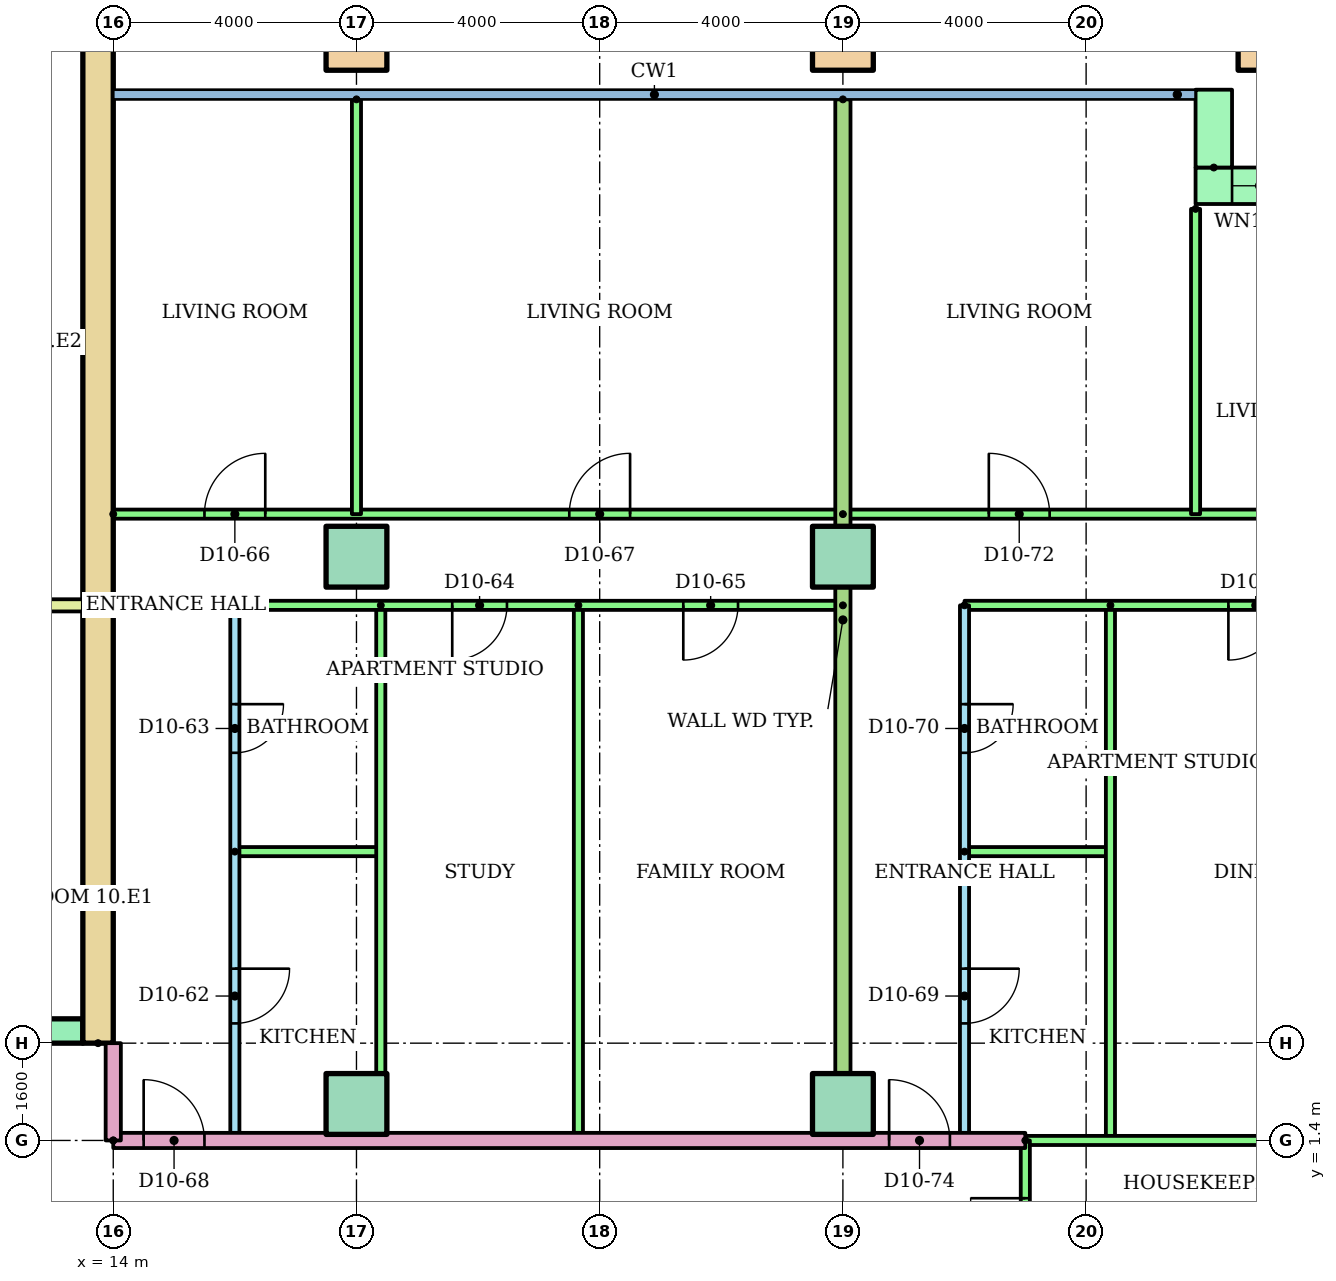
"""IFC4 building model, lengths in metres.
Left out: names, types, materials, properties, quantities, classifications, styles, units other than length and angle.
Written with IfcOpenShell. Run it as: python <this file> out.ifc"""

import sys

from ifc_helpers import new_model, si_unit, direction, frame, frame_2d, origin, origin_2d, place, context, subcontext, project, spatial, rectangle, hollow_rectangle, extrude, element, fill, save


model = new_model("IFC4")
c1 = context("Model", 3, precision=1e-05, world=origin(), true_north=direction((0.0, 1.0)))
c2 = subcontext(c1, "Body", "Model", "MODEL_VIEW")
j1 = project(units=[si_unit("LENGTHUNIT", "METRE"), si_unit("PLANEANGLEUNIT", "RADIAN")], contexts=[c1])
p1 = place(None, origin())
s1 = spatial("IfcSite", under=j1, at=p1, CompositionType="ELEMENT")
p2 = place(p1, origin())
s2 = spatial("IfcBuilding", under=s1, at=p2, CompositionType="ELEMENT")
p3 = place(p2, frame((0.0, 0.0, 41.6)))
s3 = spatial("IfcBuildingStorey", under=s2, at=p3, CompositionType="ELEMENT", Elevation=41.6)
for number, where in (
    (1, (18.0, 2.0, 0.0)),
    (2, (26.0, 2.0, 0.0)),
    (3, (18.0, 11.0, 0.0)),
    (4, (26.0, 11.0, 0.0)),
):
    element("IfcColumn", number, at=place(p3, frame(where)), inside=s3, PredefinedType="COLUMN", context=c2, shape_type="SweptSolid", body=[
        extrude(rectangle(XDim=1.0, YDim=1.0, at=origin_2d()), origin(), (0.0, 0.0, 1.0), 3.2),
    ])
for number, where in (
    (5, (18.0, 19.5, 0.0)),
    (6, (26.0, 19.5, 0.0)),
    (7, (33.0, 19.5, 0.0)),
):
    element("IfcColumn", number, at=place(p3, frame(where)), inside=s3, PredefinedType="COLUMN", context=c2, shape_type="SweptSolid", body=[
        extrude(hollow_rectangle(XDim=1.0, YDim=1.0, WallThickness=0.05, at=origin_2d()), origin(), (0.0, 0.0, 1.0), 3.2),
    ])
p4 = place(p3, frame((33.9, 17.1, 0.0), z_axis=(0.0, 0.0, 1.0), x_axis=(-1.0, 0.0, 0.0)))
e8 = element("IfcWall", 8, at=p4, inside=s3, PredefinedType="STANDARD", context=c2, shape_type="SweptSolid", body=[
    extrude(rectangle(XDim=2.1, YDim=0.6, at=frame_2d((1.05, 0.0))), origin(), (0.0, 0.0, 1.0), 2.92),
])
p5 = place(p4, frame((0.6, 0.0, 0.9)))
e9 = element("IfcOpeningElement", 9, at=p5, cuts=e8, PredefinedType="OPENING", context=c2, shape_type="SweptSolid", body=[
    extrude(rectangle(XDim=0.9, YDim=1.5, at=frame_2d((0.45, 0.75))), frame((0.0, 0.31, 0.0), z_axis=(0.0, -1.0, 0.0), x_axis=(1.0, 0.0, 0.0)), (0.0, 0.0, 1.0), 0.62),
])
p6 = place(p3, frame((32.1, 17.4, 0.0), z_axis=(0.0, 0.0, 1.0), x_axis=(0.0, 1.0, 0.0)))
e10 = element("IfcWall", 10, at=p6, inside=s3, PredefinedType="STANDARD", context=c2, shape_type="SweptSolid", body=[
    extrude(rectangle(XDim=1.28, YDim=0.6, at=frame_2d((0.64, 0.0))), origin(), (0.0, 0.0, 1.0), 2.92),
])
p7 = place(p3, frame((13.75, 3.0, 0.0), z_axis=(0.0, 0.0, 1.0), x_axis=(0.0, 1.0, 0.0)))
e11 = element("IfcWall", 11, at=p7, inside=s3, PredefinedType="SHEAR", context=c2, shape_type="SweptSolid", body=[
    extrude(rectangle(XDim=17.0, YDim=0.5, at=frame_2d((8.5, 0.0))), origin(), (0.0, 0.0, 1.0), 2.92),
])
p8 = place(p3, frame((-13.5, 3.2, 0.0)))
e12 = element("IfcWall", 12, at=p8, inside=s3, PredefinedType="SHEAR", context=c2, shape_type="SweptSolid", body=[
    extrude(rectangle(XDim=27.0, YDim=0.4, at=frame_2d((13.5, 0.0))), origin(), (0.0, 0.0, 1.0), 2.92),
])
p9 = place(p8, frame((6.861, 0.0, 0.0)))
e13 = element("IfcOpeningElement", 13, at=p9, cuts=e12, PredefinedType="OPENING", context=c2, shape_type="SweptSolid", body=[
    extrude(rectangle(XDim=1.1, YDim=2.1, at=frame_2d((0.55, 1.05))), frame((0.0, 0.21, 0.0), z_axis=(0.0, -1.0, 0.0), x_axis=(1.0, 0.0, 0.0)), (0.0, 0.0, 1.0), 0.42),
])
p10 = place(p8, frame((9.906, 0.0, 0.0)))
e14 = element("IfcOpeningElement", 14, at=p10, cuts=e12, PredefinedType="OPENING", context=c2, shape_type="SweptSolid", body=[
    extrude(rectangle(XDim=1.1, YDim=2.1, at=frame_2d((0.55, 1.05))), frame((0.0, 0.21, 0.0), z_axis=(0.0, -1.0, 0.0), x_axis=(1.0, 0.0, 0.0)), (0.0, 0.0, 1.0), 0.42),
])
p11 = place(p8, frame((15.994, 0.0, 0.0)))
e15 = element("IfcOpeningElement", 15, at=p11, cuts=e12, PredefinedType="OPENING", context=c2, shape_type="SweptSolid", body=[
    extrude(rectangle(XDim=1.1, YDim=2.1, at=frame_2d((0.55, 1.05))), frame((0.0, 0.21, 0.0), z_axis=(0.0, -1.0, 0.0), x_axis=(1.0, 0.0, 0.0)), (0.0, 0.0, 1.0), 0.42),
])
p12 = place(p8, frame((19.039, 0.0, 0.0)))
e16 = element("IfcOpeningElement", 16, at=p12, cuts=e12, PredefinedType="OPENING", context=c2, shape_type="SweptSolid", body=[
    extrude(rectangle(XDim=1.1, YDim=2.1, at=frame_2d((0.55, 1.05))), frame((0.0, 0.21, 0.0), z_axis=(0.0, -1.0, 0.0), x_axis=(1.0, 0.0, 0.0)), (0.0, 0.0, 1.0), 0.42),
])
p13 = place(p8, frame((12.6, 0.0, 0.0)))
e17 = element("IfcOpeningElement", 17, at=p13, cuts=e12, PredefinedType="OPENING", context=c2, shape_type="SweptSolid", body=[
    extrude(rectangle(XDim=1.8, YDim=2.1, at=frame_2d((0.9, 1.05))), frame((0.0, 0.21, 0.0), z_axis=(0.0, -1.0, 0.0), x_axis=(1.0, 0.0, 0.0)), (0.0, 0.0, 1.0), 0.42),
])
p14 = place(p3, frame((9.6, 10.2, 0.0)))
e18 = element("IfcWall", 18, at=p14, inside=s3, PredefinedType="PARTITIONING", context=c2, shape_type="SweptSolid", body=[
    extrude(rectangle(XDim=3.9, YDim=0.2, at=frame_2d((1.95, 0.0))), origin(), (0.0, 0.0, 1.0), 2.92),
])
p15 = place(p3, frame((16.0, 10.2, 0.0), z_axis=(0.0, 0.0, 1.0), x_axis=(0.0, -1.0, 0.0)))
e19 = element("IfcWall", 19, at=p15, inside=s3, PredefinedType="PARTITIONING", context=c2, shape_type="SweptSolid", body=[
    extrude(rectangle(XDim=8.8, YDim=0.15, at=frame_2d((4.4, 0.0))), origin(), (0.0, 0.0, 1.0), 2.4),
])
p16 = place(p15, frame((5.975, 0.0, 0.0)))
e20 = element("IfcOpeningElement", 20, at=p16, cuts=e19, PredefinedType="OPENING", context=c2, shape_type="SweptSolid", body=[
    extrude(rectangle(XDim=0.9, YDim=2.1, at=frame_2d((0.45, 1.05))), frame((0.0, 0.085, 0.0), z_axis=(0.0, -1.0, 0.0), x_axis=(1.0, 0.0, 0.0)), (0.0, 0.0, 1.0), 0.17),
])
p17 = place(p15, frame((1.625, 0.0, 0.0)))
e21 = element("IfcOpeningElement", 21, at=p17, cuts=e19, PredefinedType="OPENING", context=c2, shape_type="SweptSolid", body=[
    extrude(rectangle(XDim=0.8, YDim=2.1, at=frame_2d((0.4, 1.05))), frame((0.0, 0.085, 0.0), z_axis=(0.0, -1.0, 0.0), x_axis=(1.0, 0.0, 0.0)), (0.0, 0.0, 1.0), 0.17),
])
p18 = place(p3, frame((16.0, 6.15, 0.0)))
e22 = element("IfcWall", 22, at=p18, inside=s3, PredefinedType="PARTITIONING", context=c2, shape_type="SweptSolid", body=[
    extrude(rectangle(XDim=2.4, YDim=0.15, at=frame_2d((1.2, 0.0))), origin(), (0.0, 0.0, 1.0), 2.4),
])
for number, where, z_axis, x_axis in (
    (23, (18.4, 10.2, 0.0), (0.0, 0.0, 1.0), (0.0, -1.0, 0.0)),
    (24, (21.65, 10.2, 0.0), (0.0, 0.0, 1.0), (0.0, -1.0, 0.0)),
):
    element("IfcWall", number, at=place(p3, frame(where, z_axis=z_axis, x_axis=x_axis)), inside=s3, PredefinedType="PARTITIONING", context=c2, shape_type="SweptSolid", body=[
        extrude(rectangle(XDim=8.8, YDim=0.15, at=frame_2d((4.4, 0.0))), origin(), (0.0, 0.0, 1.0), 2.4),
    ])
p19 = place(p3, frame((26.0, 10.2, 0.0), z_axis=(0.0, 0.0, 1.0), x_axis=(-1.0, 0.0, 0.0)))
e25 = element("IfcWall", 25, at=p19, inside=s3, PredefinedType="PARTITIONING", context=c2, shape_type="SweptSolid", body=[
    extrude(rectangle(XDim=10.0, YDim=0.15, at=frame_2d((5.0, 0.0))), origin(), (0.0, 0.0, 1.0), 2.4),
])
p20 = place(p19, frame((5.525, 0.0, 0.0)))
e26 = element("IfcOpeningElement", 26, at=p20, cuts=e25, PredefinedType="OPENING", context=c2, shape_type="SweptSolid", body=[
    extrude(rectangle(XDim=0.9, YDim=2.1, at=frame_2d((0.45, 1.05))), frame((0.0, 0.085, 0.0), z_axis=(0.0, -1.0, 0.0), x_axis=(1.0, 0.0, 0.0)), (0.0, 0.0, 1.0), 0.17),
])
p21 = place(p19, frame((1.725, 0.0, 0.0)))
e27 = element("IfcOpeningElement", 27, at=p21, cuts=e25, PredefinedType="OPENING", context=c2, shape_type="SweptSolid", body=[
    extrude(rectangle(XDim=0.9, YDim=2.1, at=frame_2d((0.45, 1.05))), frame((0.0, 0.085, 0.0), z_axis=(0.0, -1.0, 0.0), x_axis=(1.0, 0.0, 0.0)), (0.0, 0.0, 1.0), 0.17),
])
p22 = place(p3, frame((14.0, 11.7, 0.0)))
e28 = element("IfcWall", 28, at=p22, inside=s3, PredefinedType="PARTITIONING", context=c2, shape_type="SweptSolid", body=[
    extrude(rectangle(XDim=12.0, YDim=0.15, at=frame_2d((6.0, 0.0))), origin(), (0.0, 0.0, 1.0), 2.4),
])
p23 = place(p22, frame((1.5, 0.0, 0.0)))
e29 = element("IfcOpeningElement", 29, at=p23, cuts=e28, PredefinedType="OPENING", context=c2, shape_type="SweptSolid", body=[
    extrude(rectangle(XDim=1.0, YDim=2.1, at=frame_2d((0.5, 1.05))), frame((0.0, 0.085, 0.0), z_axis=(0.0, -1.0, 0.0), x_axis=(1.0, 0.0, 0.0)), (0.0, 0.0, 1.0), 0.17),
])
p24 = place(p22, frame((7.5, 0.0, 0.0)))
e30 = element("IfcOpeningElement", 30, at=p24, cuts=e28, PredefinedType="OPENING", context=c2, shape_type="SweptSolid", body=[
    extrude(rectangle(XDim=1.0, YDim=2.1, at=frame_2d((0.5, 1.05))), frame((0.0, 0.085, 0.0), z_axis=(0.0, -1.0, 0.0), x_axis=(1.0, 0.0, 0.0)), (0.0, 0.0, 1.0), 0.17),
])
p25 = place(p3, frame((18.0, 18.521, 0.0), z_axis=(0.0, 0.0, 1.0), x_axis=(0.0, -1.0, 0.0)))
e31 = element("IfcWall", 31, at=p25, inside=s3, PredefinedType="PARTITIONING", context=c2, shape_type="SweptSolid", body=[
    extrude(rectangle(XDim=6.821, YDim=0.15, at=frame_2d((3.411, 0.0))), origin(), (0.0, 0.0, 1.0), 2.4),
])
p26 = place(p3, frame((28.0, 10.2, 0.0), z_axis=(0.0, 0.0, 1.0), x_axis=(0.0, -1.0, 0.0)))
e32 = element("IfcWall", 32, at=p26, inside=s3, PredefinedType="PARTITIONING", context=c2, shape_type="SweptSolid", body=[
    extrude(rectangle(XDim=8.8, YDim=0.15, at=frame_2d((4.4, 0.0))), origin(), (0.0, 0.0, 1.0), 2.4),
])
p27 = place(p26, frame((5.975, 0.0, 0.0)))
e33 = element("IfcOpeningElement", 33, at=p27, cuts=e32, PredefinedType="OPENING", context=c2, shape_type="SweptSolid", body=[
    extrude(rectangle(XDim=0.9, YDim=2.1, at=frame_2d((0.45, 1.05))), frame((0.0, 0.085, 0.0), z_axis=(0.0, -1.0, 0.0), x_axis=(1.0, 0.0, 0.0)), (0.0, 0.0, 1.0), 0.17),
])
p28 = place(p26, frame((1.625, 0.0, 0.0)))
e34 = element("IfcOpeningElement", 34, at=p28, cuts=e32, PredefinedType="OPENING", context=c2, shape_type="SweptSolid", body=[
    extrude(rectangle(XDim=0.8, YDim=2.1, at=frame_2d((0.4, 1.05))), frame((0.0, 0.085, 0.0), z_axis=(0.0, -1.0, 0.0), x_axis=(1.0, 0.0, 0.0)), (0.0, 0.0, 1.0), 0.17),
])
p29 = place(p3, frame((28.0, 6.15, 0.0)))
e35 = element("IfcWall", 35, at=p29, inside=s3, PredefinedType="PARTITIONING", context=c2, shape_type="SweptSolid", body=[
    extrude(rectangle(XDim=2.4, YDim=0.15, at=frame_2d((1.2, 0.0))), origin(), (0.0, 0.0, 1.0), 2.4),
])
p30 = place(p3, frame((30.4, 10.2, 0.0), z_axis=(0.0, 0.0, 1.0), x_axis=(0.0, -1.0, 0.0)))
e36 = element("IfcWall", 36, at=p30, inside=s3, PredefinedType="PARTITIONING", context=c2, shape_type="SweptSolid", body=[
    extrude(rectangle(XDim=8.8, YDim=0.15, at=frame_2d((4.4, 0.0))), origin(), (0.0, 0.0, 1.0), 2.4),
])
p31 = place(p3, frame((36.51, 10.2, 0.0), z_axis=(0.0, 0.0, 1.0), x_axis=(-1.0, 0.0, 0.0)))
e37 = element("IfcWall", 37, at=p31, inside=s3, PredefinedType="PARTITIONING", context=c2, shape_type="SweptSolid", body=[
    extrude(rectangle(XDim=8.51, YDim=0.15, at=frame_2d((4.255, 0.0))), origin(), (0.0, 0.0, 1.0), 2.4),
])
p32 = place(p31, frame((3.27, 0.0, 0.0)))
e38 = element("IfcOpeningElement", 38, at=p32, cuts=e37, PredefinedType="OPENING", context=c2, shape_type="SweptSolid", body=[
    extrude(rectangle(XDim=0.9, YDim=2.1, at=frame_2d((0.45, 1.05))), frame((0.0, 0.085, 0.0), z_axis=(0.0, -1.0, 0.0), x_axis=(1.0, 0.0, 0.0)), (0.0, 0.0, 1.0), 0.17),
])
p33 = place(p3, frame((26.0, 11.7, 0.0)))
e39 = element("IfcWall", 39, at=p33, inside=s3, PredefinedType="PARTITIONING", context=c2, shape_type="SweptSolid", body=[
    extrude(rectangle(XDim=10.52, YDim=0.15, at=frame_2d((5.26, 0.0))), origin(), (0.0, 0.0, 1.0), 2.4),
])
p34 = place(p33, frame((2.4, 0.0, 0.0)))
e40 = element("IfcOpeningElement", 40, at=p34, cuts=e39, PredefinedType="OPENING", context=c2, shape_type="SweptSolid", body=[
    extrude(rectangle(XDim=1.0, YDim=2.1, at=frame_2d((0.5, 1.05))), frame((0.0, 0.085, 0.0), z_axis=(0.0, -1.0, 0.0), x_axis=(1.0, 0.0, 0.0)), (0.0, 0.0, 1.0), 0.17),
])
p35 = place(p33, frame((8.76, 0.0, 0.0)))
e41 = element("IfcOpeningElement", 41, at=p35, cuts=e39, PredefinedType="OPENING", context=c2, shape_type="SweptSolid", body=[
    extrude(rectangle(XDim=1.0, YDim=2.1, at=frame_2d((0.5, 1.05))), frame((0.0, 0.085, 0.0), z_axis=(0.0, -1.0, 0.0), x_axis=(1.0, 0.0, 0.0)), (0.0, 0.0, 1.0), 0.17),
])
p36 = place(p3, frame((31.8, 16.72, 0.0), z_axis=(0.0, 0.0, 1.0), x_axis=(0.0, -1.0, 0.0)))
e42 = element("IfcWall", 42, at=p36, inside=s3, PredefinedType="PARTITIONING", context=c2, shape_type="SweptSolid", body=[
    extrude(rectangle(XDim=5.02, YDim=0.15, at=frame_2d((2.51, 0.0))), origin(), (0.0, 0.0, 1.0), 2.4),
])
p37 = place(p3, frame((26.0, 18.521, 0.0), z_axis=(0.0, 0.0, 1.0), x_axis=(0.0, -1.0, 0.0)))
e43 = element("IfcWall", 43, at=p37, inside=s3, PredefinedType="PARTITIONING", context=c2, shape_type="SweptSolid", body=[
    extrude(rectangle(XDim=17.121, YDim=0.25, at=frame_2d((8.561, 0.0))), origin(), (0.0, 0.0, 1.0), 2.4),
])
p38 = place(p3, frame((14.0, 1.4, 0.0)))
e44 = element("IfcWall", 44, at=p38, inside=s3, PredefinedType="PARTITIONING", context=c2, shape_type="SweptSolid", body=[
    extrude(rectangle(XDim=15.0, YDim=0.25, at=frame_2d((7.5, 0.0))), origin(), (0.0, 0.0, 1.0), 2.4),
])
p39 = place(p38, frame((0.5, 0.0, 0.0)))
e45 = element("IfcOpeningElement", 45, at=p39, cuts=e44, PredefinedType="OPENING", context=c2, shape_type="SweptSolid", body=[
    extrude(rectangle(XDim=1.0, YDim=2.1, at=frame_2d((0.5, 1.05))), frame((0.0, 0.135, 0.0), z_axis=(0.0, -1.0, 0.0), x_axis=(1.0, 0.0, 0.0)), (0.0, 0.0, 1.0), 0.27),
])
p40 = place(p38, frame((12.76, 0.0, 0.0)))
e46 = element("IfcOpeningElement", 46, at=p40, cuts=e44, PredefinedType="OPENING", context=c2, shape_type="SweptSolid", body=[
    extrude(rectangle(XDim=1.0, YDim=2.1, at=frame_2d((0.5, 1.05))), frame((0.0, 0.135, 0.0), z_axis=(0.0, -1.0, 0.0), x_axis=(1.0, 0.0, 0.0)), (0.0, 0.0, 1.0), 0.27),
])
p41 = place(p3, frame((29.0, 1.4, 0.0)))
e47 = element("IfcWall", 47, at=p41, inside=s3, PredefinedType="PARTITIONING", context=c2, shape_type="SweptSolid", body=[
    extrude(rectangle(XDim=7.52, YDim=0.15, at=frame_2d((3.76, 0.0))), origin(), (0.0, 0.0, 1.0), 2.4),
])
p42 = place(p3, frame((29.0, -1.4, 0.0), z_axis=(0.0, 0.0, 1.0), x_axis=(0.0, 1.0, 0.0)))
e48 = element("IfcWall", 48, at=p42, inside=s3, PredefinedType="PARTITIONING", context=c2, shape_type="SweptSolid", body=[
    extrude(rectangle(XDim=2.8, YDim=0.15, at=frame_2d((1.4, 0.0))), origin(), (0.0, 0.0, 1.0), 2.4),
])
p43 = place(p42, frame((0.95, 0.0, 0.0)))
e49 = element("IfcOpeningElement", 49, at=p43, cuts=e48, PredefinedType="OPENING", context=c2, shape_type="SweptSolid", body=[
    extrude(rectangle(XDim=0.9, YDim=2.1, at=frame_2d((0.45, 1.05))), frame((0.0, 0.085, 0.0), z_axis=(0.0, -1.0, 0.0), x_axis=(1.0, 0.0, 0.0)), (0.0, 0.0, 1.0), 0.17),
])
p44 = place(p3, frame((14.0, 1.4, 0.0), z_axis=(0.0, 0.0, 1.0), x_axis=(0.0, 1.0, 0.0)))
e50 = element("IfcWall", 50, at=p44, inside=s3, PredefinedType="PARTITIONING", context=c2, shape_type="SweptSolid", body=[
    extrude(rectangle(XDim=1.6, YDim=0.25, at=frame_2d((0.8, 0.0))), origin(), (0.0, 0.0, 1.0), 2.4),
])
p45 = place(p5, origin())
e51 = element("IfcWindow", 51, at=p45, inside=s3, PartitioningType="SINGLE_PANEL", PredefinedType="WINDOW", context=c2, shape_type="SweptSolid", body=[
    extrude(rectangle(XDim=0.9, YDim=1.5, at=frame_2d((0.45, 0.75))), frame((0.0, 0.03, 0.0), z_axis=(0.0, -1.0, 0.0), x_axis=(1.0, 0.0, 0.0)), (0.0, 0.0, 1.0), 0.06),
])
fill(e9, e51)
p46 = place(p16, origin())
e52 = element("IfcDoor", 52, at=p46, inside=s3, OperationType="SINGLE_SWING_LEFT", PredefinedType="DOOR", context=c2, shape_type="SweptSolid", body=[
    extrude(rectangle(XDim=0.9, YDim=2.1, at=frame_2d((0.45, 1.05))), frame((0.0, 0.025, 0.0), z_axis=(0.0, -1.0, 0.0), x_axis=(1.0, 0.0, 0.0)), (0.0, 0.0, 1.0), 0.05),
])
fill(e20, e52)
p47 = place(p17, origin())
e53 = element("IfcDoor", 53, at=p47, inside=s3, OperationType="SINGLE_SWING_LEFT", PredefinedType="DOOR", context=c2, shape_type="SweptSolid", body=[
    extrude(rectangle(XDim=0.8, YDim=2.1, at=frame_2d((0.4, 1.05))), frame((0.0, 0.025, 0.0), z_axis=(0.0, -1.0, 0.0), x_axis=(1.0, 0.0, 0.0)), (0.0, 0.0, 1.0), 0.05),
])
fill(e21, e53)
p48 = place(p20, origin())
e54 = element("IfcDoor", 54, at=p48, inside=s3, OperationType="SINGLE_SWING_RIGHT", PredefinedType="DOOR", context=c2, shape_type="SweptSolid", body=[
    extrude(rectangle(XDim=0.9, YDim=2.1, at=frame_2d((0.45, 1.05))), frame((0.0, 0.025, 0.0), z_axis=(0.0, -1.0, 0.0), x_axis=(1.0, 0.0, 0.0)), (0.0, 0.0, 1.0), 0.05),
])
fill(e26, e54)
p49 = place(p21, origin())
e55 = element("IfcDoor", 55, at=p49, inside=s3, OperationType="SINGLE_SWING_RIGHT", PredefinedType="DOOR", context=c2, shape_type="SweptSolid", body=[
    extrude(rectangle(XDim=0.9, YDim=2.1, at=frame_2d((0.45, 1.05))), frame((0.0, 0.025, 0.0), z_axis=(0.0, -1.0, 0.0), x_axis=(1.0, 0.0, 0.0)), (0.0, 0.0, 1.0), 0.05),
])
fill(e27, e55)
p50 = place(p23, origin())
e56 = element("IfcDoor", 56, at=p50, inside=s3, OperationType="SINGLE_SWING_RIGHT", PredefinedType="DOOR", context=c2, shape_type="SweptSolid", body=[
    extrude(rectangle(XDim=1.0, YDim=2.1, at=frame_2d((0.5, 1.05))), frame((0.0, 0.025, 0.0), z_axis=(0.0, -1.0, 0.0), x_axis=(1.0, 0.0, 0.0)), (0.0, 0.0, 1.0), 0.05),
])
fill(e29, e56)
p51 = place(p24, origin())
e57 = element("IfcDoor", 57, at=p51, inside=s3, OperationType="SINGLE_SWING_RIGHT", PredefinedType="DOOR", context=c2, shape_type="SweptSolid", body=[
    extrude(rectangle(XDim=1.0, YDim=2.1, at=frame_2d((0.5, 1.05))), frame((0.0, 0.025, 0.0), z_axis=(0.0, -1.0, 0.0), x_axis=(1.0, 0.0, 0.0)), (0.0, 0.0, 1.0), 0.05),
])
fill(e30, e57)
p52 = place(p39, origin())
e58 = element("IfcDoor", 58, at=p52, inside=s3, OperationType="SINGLE_SWING_LEFT", PredefinedType="DOOR", context=c2, shape_type="SweptSolid", body=[
    extrude(rectangle(XDim=1.0, YDim=2.1, at=frame_2d((0.5, 1.05))), frame((0.0, 0.025, 0.0), z_axis=(0.0, -1.0, 0.0), x_axis=(1.0, 0.0, 0.0)), (0.0, 0.0, 1.0), 0.05),
])
fill(e45, e58)
p53 = place(p27, origin())
e59 = element("IfcDoor", 59, at=p53, inside=s3, OperationType="SINGLE_SWING_LEFT", PredefinedType="DOOR", context=c2, shape_type="SweptSolid", body=[
    extrude(rectangle(XDim=0.9, YDim=2.1, at=frame_2d((0.45, 1.05))), frame((0.0, 0.025, 0.0), z_axis=(0.0, -1.0, 0.0), x_axis=(1.0, 0.0, 0.0)), (0.0, 0.0, 1.0), 0.05),
])
fill(e33, e59)
p54 = place(p28, origin())
e60 = element("IfcDoor", 60, at=p54, inside=s3, OperationType="SINGLE_SWING_LEFT", PredefinedType="DOOR", context=c2, shape_type="SweptSolid", body=[
    extrude(rectangle(XDim=0.8, YDim=2.1, at=frame_2d((0.4, 1.05))), frame((0.0, 0.025, 0.0), z_axis=(0.0, -1.0, 0.0), x_axis=(1.0, 0.0, 0.0)), (0.0, 0.0, 1.0), 0.05),
])
fill(e34, e60)
p55 = place(p32, origin())
e61 = element("IfcDoor", 61, at=p55, inside=s3, OperationType="SINGLE_SWING_RIGHT", PredefinedType="DOOR", context=c2, shape_type="SweptSolid", body=[
    extrude(rectangle(XDim=0.9, YDim=2.1, at=frame_2d((0.45, 1.05))), frame((0.0, 0.025, 0.0), z_axis=(0.0, -1.0, 0.0), x_axis=(1.0, 0.0, 0.0)), (0.0, 0.0, 1.0), 0.05),
])
fill(e38, e61)
p56 = place(p34, origin())
e62 = element("IfcDoor", 62, at=p56, inside=s3, OperationType="SINGLE_SWING_LEFT", PredefinedType="DOOR", context=c2, shape_type="SweptSolid", body=[
    extrude(rectangle(XDim=1.0, YDim=2.1, at=frame_2d((0.5, 1.05))), frame((0.0, 0.025, 0.0), z_axis=(0.0, -1.0, 0.0), x_axis=(1.0, 0.0, 0.0)), (0.0, 0.0, 1.0), 0.05),
])
fill(e40, e62)
p57 = place(p40, origin())
e63 = element("IfcDoor", 63, at=p57, inside=s3, OperationType="SINGLE_SWING_LEFT", PredefinedType="DOOR", context=c2, shape_type="SweptSolid", body=[
    extrude(rectangle(XDim=1.0, YDim=2.1, at=frame_2d((0.5, 1.05))), frame((0.0, 0.025, 0.0), z_axis=(0.0, -1.0, 0.0), x_axis=(1.0, 0.0, 0.0)), (0.0, 0.0, 1.0), 0.05),
])
fill(e46, e63)
p58 = place(p43, origin())
e64 = element("IfcDoor", 64, at=p58, inside=s3, OperationType="SINGLE_SWING_RIGHT", PredefinedType="DOOR", context=c2, shape_type="SweptSolid", body=[
    extrude(rectangle(XDim=0.9, YDim=2.1, at=frame_2d((0.45, 1.05))), frame((0.0, 0.025, 0.0), z_axis=(0.0, -1.0, 0.0), x_axis=(1.0, 0.0, 0.0)), (0.0, 0.0, 1.0), 0.05),
])
fill(e49, e64)
save(model, sys.argv[1])
